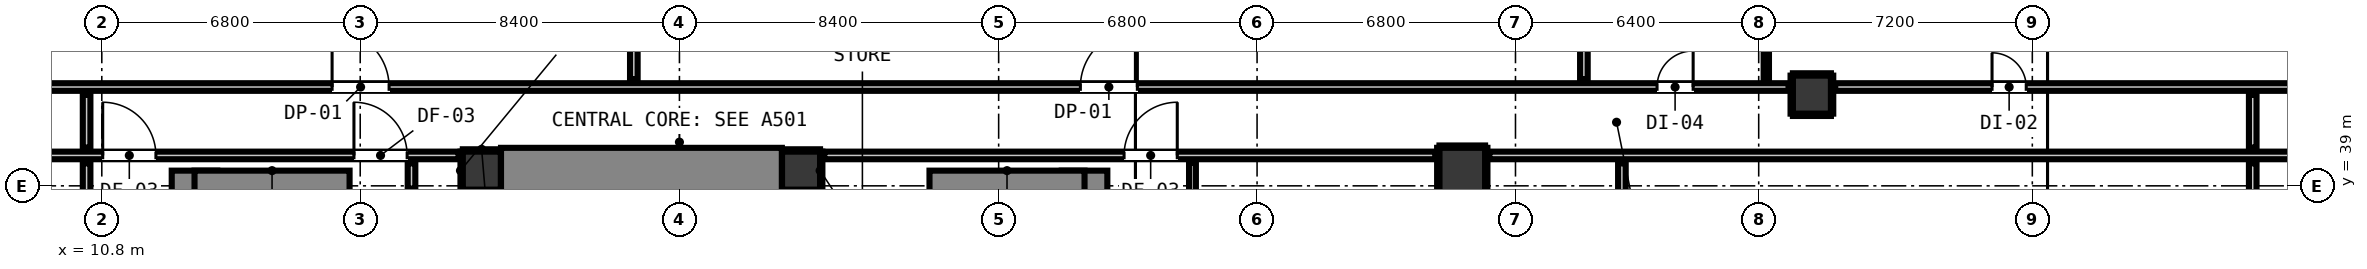
"""IFC4 building model, lengths in metres.
Left out: names, types, materials, properties, quantities, classifications, styles, units other than length and angle.
Written with IfcOpenShell. Run it as: python <this file> out.ifc"""

import sys

from ifc_helpers import new_model, si_unit, direction, frame, frame_2d, origin, origin_2d, place, context, subcontext, project, spatial, rectangle, circle, extrude, element, fill, save


model = new_model("IFC4")
c1 = context("Model", 3, precision=1e-05, world=origin(), true_north=direction((0.0, 1.0)))
c2 = subcontext(c1, "Body", "Model", "MODEL_VIEW")
j1 = project(units=[si_unit("LENGTHUNIT", "METRE"), si_unit("PLANEANGLEUNIT", "RADIAN")], contexts=[c1])
p1 = place(None, origin())
s1 = spatial("IfcSite", under=j1, at=p1, CompositionType="ELEMENT")
p2 = place(p1, origin())
s2 = spatial("IfcBuilding", under=s1, at=p2, CompositionType="ELEMENT")
p3 = place(p2, frame((0.0, 0.0, -13.2)))
s3 = spatial("IfcBuildingStorey", under=s2, at=p3, CompositionType="ELEMENT", Elevation=-13.2)
for number, where, z_axis, x_axis in (
    (1, (20.8, 39.4, -0.4), (0.0, 0.0, 1.0), (1.0, 0.0, 0.0)),
    (2, (29.2, 39.4, -0.4), (0.0, 0.0, 1.0), (1.0, 0.0, 0.0)),
):
    element("IfcColumn", number, at=place(p3, frame(where, z_axis=z_axis, x_axis=x_axis)), inside=s3, PredefinedType="COLUMN", context=c2, shape_type="SweptSolid", body=[
        extrude(rectangle(XDim=1.0, YDim=1.0, at=origin_2d()), origin(), (0.0, 0.0, 1.0), 4.8),
    ])
p4 = place(p3, frame((13.24, 31.205, 0.0), z_axis=(0.0, 0.0, 1.0), x_axis=(0.0, 1.0, 0.0)))
e3 = element("IfcWall", 3, at=p4, inside=s3, PredefinedType="SHEAR", context=c2, shape_type="SweptSolid", body=[
    extrude(rectangle(XDim=8.195, YDim=1.2, at=frame_2d((4.097, 0.0))), origin(), (0.0, 0.0, 1.0), 4.4),
])
p5 = place(p3, frame((13.24, 39.1, 0.0), z_axis=(0.0, 0.0, 1.0), x_axis=(1.0, 0.0, 0.0)))
e4 = element("IfcWall", 4, at=p5, inside=s3, PredefinedType="SHEAR", context=c2, shape_type="SweptSolid", body=[
    extrude(rectangle(XDim=4.08, YDim=0.6, at=frame_2d((2.04, 0.0))), origin(), (0.0, 0.0, 1.0), 4.4),
])
p6 = place(p3, frame((36.66, 31.205, 0.0), z_axis=(0.0, 0.0, 1.0), x_axis=(0.0, 1.0, 0.0)))
e5 = element("IfcWall", 5, at=p6, inside=s3, PredefinedType="SHEAR", context=c2, shape_type="SweptSolid", body=[
    extrude(rectangle(XDim=8.195, YDim=1.2, at=frame_2d((4.097, 0.0))), origin(), (0.0, 0.0, 1.0), 4.4),
])
p7 = place(p3, frame((32.58, 39.1, 0.0), z_axis=(0.0, 0.0, 1.0), x_axis=(1.0, 0.0, 0.0)))
e6 = element("IfcWall", 6, at=p7, inside=s3, PredefinedType="SHEAR", context=c2, shape_type="SweptSolid", body=[
    extrude(rectangle(XDim=4.08, YDim=0.6, at=frame_2d((2.04, 0.0))), origin(), (0.0, 0.0, 1.0), 4.4),
])
p8 = place(p3, frame((21.305, 39.4, 0.0), z_axis=(0.0, 0.0, 1.0), x_axis=(1.0, 0.0, 0.0)))
e7 = element("IfcWall", 7, at=p8, inside=s3, PredefinedType="SHEAR", context=c2, shape_type="SweptSolid", body=[
    extrude(rectangle(XDim=7.39, YDim=1.2, at=frame_2d((3.695, 0.0))), origin(), (0.0, 0.0, 1.0), 4.4),
])
p9 = place(p3, frame((46.6, 39.4, -0.4), z_axis=(0.0, 0.0, 1.0), x_axis=(1.0, 0.0, 0.0)))
e8 = element("IfcColumn", 8, at=p9, inside=s3, PredefinedType="COLUMN", context=c2, shape_type="SweptSolid", body=[
    extrude(circle(Radius=0.6, at=origin_2d()), origin(), (0.0, 0.0, 1.0), 4.8),
])
p10 = place(p3, frame((55.8, 41.4, -0.4), z_axis=(0.0, 0.0, 1.0), x_axis=(1.0, 0.0, 0.0)))
e9 = element("IfcColumn", 9, at=p10, inside=s3, PredefinedType="COLUMN", context=c2, shape_type="SweptSolid", body=[
    extrude(rectangle(XDim=1.0, YDim=1.0, at=origin_2d()), origin(), (0.0, 0.0, 1.0), 4.8),
])
p11 = place(p3, frame((6.312, 39.8, 0.0), z_axis=(0.0, 0.0, 1.0), x_axis=(1.0, 0.0, 0.0)))
e10 = element("IfcWall", 10, at=p11, inside=s3, PredefinedType="PARTITIONING", context=c2, shape_type="SweptSolid", body=[
    extrude(rectangle(XDim=13.876, YDim=0.2, at=frame_2d((6.938, 0.0))), origin(), (0.0, 0.0, 1.0), 3.335),
])
p12 = place(p11, frame((11.123, 0.0, 0.0)))
e11 = element("IfcOpeningElement", 11, at=p12, cuts=e10, PredefinedType="OPENING", context=c2, shape_type="SweptSolid", body=[
    extrude(rectangle(XDim=1.4, YDim=2.15, at=frame_2d((0.7, 1.075))), frame((0.0, 0.11, 0.0), z_axis=(0.0, -1.0, 0.0), x_axis=(1.0, 0.0, 0.0)), (0.0, 0.0, 1.0), 0.22),
])
p13 = place(p11, frame((4.512, 0.0, 0.0)))
e12 = element("IfcOpeningElement", 12, at=p13, cuts=e10, PredefinedType="OPENING", context=c2, shape_type="SweptSolid", body=[
    extrude(rectangle(XDim=1.4, YDim=2.15, at=frame_2d((0.7, 1.075))), frame((0.0, 0.11, 0.0), z_axis=(0.0, -1.0, 0.0), x_axis=(1.0, 0.0, 0.0)), (0.0, 0.0, 1.0), 0.22),
])
p14 = place(p3, frame((29.812, 39.8, 0.0), z_axis=(0.0, 0.0, 1.0), x_axis=(1.0, 0.0, 0.0)))
e13 = element("IfcWall", 13, at=p14, inside=s3, PredefinedType="PARTITIONING", context=c2, shape_type="SweptSolid", body=[
    extrude(rectangle(XDim=16.076, YDim=0.2, at=frame_2d((8.038, 0.0))), origin(), (0.0, 0.0, 1.0), 3.335),
])
p15 = place(p14, frame((7.888, 0.0, 0.0)))
e14 = element("IfcOpeningElement", 14, at=p15, cuts=e13, PredefinedType="OPENING", context=c2, shape_type="SweptSolid", body=[
    extrude(rectangle(XDim=1.4, YDim=2.15, at=frame_2d((0.7, 1.075))), frame((0.0, 0.11, 0.0), z_axis=(0.0, -1.0, 0.0), x_axis=(1.0, 0.0, 0.0)), (0.0, 0.0, 1.0), 0.22),
])
p16 = place(p3, frame((47.312, 39.8, 0.0), z_axis=(0.0, 0.0, 1.0), x_axis=(1.0, 0.0, 0.0)))
e15 = element("IfcWall", 15, at=p16, inside=s3, PredefinedType="PARTITIONING", context=c2, shape_type="SweptSolid", body=[
    extrude(rectangle(XDim=23.088, YDim=0.2, at=frame_2d((11.544, 0.0))), origin(), (0.0, 0.0, 1.0), 4.1),
])
p17 = place(p3, frame((2.2, 41.6, 0.0), z_axis=(0.0, 0.0, 1.0), x_axis=(1.0, 0.0, 0.0)))
e16 = element("IfcWall", 16, at=p17, inside=s3, PredefinedType="PARTITIONING", context=c2, shape_type="SweptSolid", body=[
    extrude(rectangle(XDim=52.988, YDim=0.2, at=frame_2d((26.494, 0.0))), origin(), (0.0, 0.0, 1.0), 4.1),
])
p18 = place(p17, frame((14.66, 0.0, 0.0)))
e17 = element("IfcOpeningElement", 17, at=p18, cuts=e16, PredefinedType="OPENING", context=c2, shape_type="SweptSolid", body=[
    extrude(rectangle(XDim=1.5, YDim=2.15, at=frame_2d((0.75, 1.075))), frame((0.0, 0.11, 0.0), z_axis=(0.0, -1.0, 0.0), x_axis=(1.0, 0.0, 0.0)), (0.0, 0.0, 1.0), 0.22),
])
p19 = place(p17, frame((34.35, 0.0, 0.0)))
e18 = element("IfcOpeningElement", 18, at=p19, cuts=e16, PredefinedType="OPENING", context=c2, shape_type="SweptSolid", body=[
    extrude(rectangle(XDim=1.5, YDim=2.15, at=frame_2d((0.75, 1.075))), frame((0.0, 0.11, 0.0), z_axis=(0.0, -1.0, 0.0), x_axis=(1.0, 0.0, 0.0)), (0.0, 0.0, 1.0), 0.22),
])
p20 = place(p17, frame((49.525, 0.0, 0.0)))
e19 = element("IfcOpeningElement", 19, at=p20, cuts=e16, PredefinedType="OPENING", context=c2, shape_type="SweptSolid", body=[
    extrude(rectangle(XDim=0.95, YDim=2.1, at=frame_2d((0.475, 1.05))), frame((0.0, 0.11, 0.0), z_axis=(0.0, -1.0, 0.0), x_axis=(1.0, 0.0, 0.0)), (0.0, 0.0, 1.0), 0.22),
])
p21 = place(p3, frame((56.412, 41.6, 0.0), z_axis=(0.0, 0.0, 1.0), x_axis=(1.0, 0.0, 0.0)))
e20 = element("IfcWall", 20, at=p21, inside=s3, PredefinedType="PARTITIONING", context=c2, shape_type="SweptSolid", body=[
    extrude(rectangle(XDim=24.776, YDim=0.2, at=frame_2d((12.388, 0.0))), origin(), (0.0, 0.0, 1.0), 4.1),
])
p22 = place(p21, frame((4.128, 0.0, 0.0)))
e21 = element("IfcOpeningElement", 21, at=p22, cuts=e20, PredefinedType="OPENING", context=c2, shape_type="SweptSolid", body=[
    extrude(rectangle(XDim=0.9, YDim=2.1, at=frame_2d((0.45, 1.05))), frame((0.0, 0.11, 0.0), z_axis=(0.0, -1.0, 0.0), x_axis=(1.0, 0.0, 0.0)), (0.0, 0.0, 1.0), 0.22),
])
p23 = place(p3, frame((10.4, 21.828, 0.0), z_axis=(0.0, 0.0, 1.0), x_axis=(0.0, 1.0, 0.0)))
e22 = element("IfcWall", 22, at=p23, inside=s3, PredefinedType="PARTITIONING", context=c2, shape_type="SweptSolid", body=[
    extrude(rectangle(XDim=17.764, YDim=0.2, at=frame_2d((8.882, 0.0))), origin(), (0.0, 0.0, 1.0), 4.1),
])
p24 = place(p3, frame((10.4, 40.008, 0.0), z_axis=(0.0, 0.0, 1.0), x_axis=(0.0, 1.0, 0.0)))
e23 = element("IfcWall", 23, at=p24, inside=s3, PredefinedType="PARTITIONING", context=c2, shape_type="SweptSolid", body=[
    extrude(rectangle(XDim=1.384, YDim=0.2, at=frame_2d((0.692, 0.0))), origin(), (0.0, 0.0, 1.0), 4.1),
])
p25 = place(p3, frame((18.95, 38.928, 0.0), z_axis=(0.0, 0.0, 1.0), x_axis=(0.0, 1.0, 0.0)))
e24 = element("IfcWall", 24, at=p25, inside=s3, PredefinedType="PARTITIONING", context=c2, shape_type="SweptSolid", body=[
    extrude(rectangle(XDim=0.664, YDim=0.2, at=frame_2d((0.332, 0.0))), origin(), (0.0, 0.0, 1.0), 4.1),
])
p26 = place(p3, frame((24.8, 41.808, 0.0), z_axis=(0.0, 0.0, 1.0), x_axis=(0.0, 1.0, 0.0)))
e25 = element("IfcWall", 25, at=p26, inside=s3, PredefinedType="PARTITIONING", context=c2, shape_type="SweptSolid", body=[
    extrude(rectangle(XDim=15.784, YDim=0.2, at=frame_2d((7.892, 0.0))), origin(), (0.0, 0.0, 1.0), 4.1),
])
p27 = place(p3, frame((49.8, 41.808, 0.0), z_axis=(0.0, 0.0, 1.0), x_axis=(0.0, 1.0, 0.0)))
e26 = element("IfcWall", 26, at=p27, inside=s3, PredefinedType="PARTITIONING", context=c2, shape_type="SweptSolid", body=[
    extrude(rectangle(XDim=4.214, YDim=0.2, at=frame_2d((2.107, 0.0))), origin(), (0.0, 0.0, 1.0), 4.1),
])
p28 = place(p3, frame((50.8, 36.808, 0.0), z_axis=(0.0, 0.0, 1.0), x_axis=(0.0, 1.0, 0.0)))
e27 = element("IfcWall", 27, at=p28, inside=s3, PredefinedType="PARTITIONING", context=c2, shape_type="SweptSolid", body=[
    extrude(rectangle(XDim=2.784, YDim=0.2, at=frame_2d((1.392, 0.0))), origin(), (0.0, 0.0, 1.0), 4.1),
])
p29 = place(p3, frame((67.4, 21.828, 0.0), z_axis=(0.0, 0.0, 1.0), x_axis=(0.0, 1.0, 0.0)))
e28 = element("IfcWall", 28, at=p29, inside=s3, PredefinedType="PARTITIONING", context=c2, shape_type="SweptSolid", body=[
    extrude(rectangle(XDim=17.764, YDim=0.2, at=frame_2d((8.882, 0.0))), origin(), (0.0, 0.0, 1.0), 4.1),
])
p30 = place(p3, frame((67.4, 40.008, 0.0), z_axis=(0.0, 0.0, 1.0), x_axis=(0.0, 1.0, 0.0)))
e29 = element("IfcWall", 29, at=p30, inside=s3, PredefinedType="PARTITIONING", context=c2, shape_type="SweptSolid", body=[
    extrude(rectangle(XDim=1.384, YDim=0.2, at=frame_2d((0.692, 0.0))), origin(), (0.0, 0.0, 1.0), 4.1),
])
p31 = place(p3, frame((39.5, 21.818, 0.0), z_axis=(0.0, 0.0, 1.0), x_axis=(0.0, 1.0, 0.0)))
e30 = element("IfcWall", 30, at=p31, inside=s3, PredefinedType="PARTITIONING", context=c2, shape_type="SweptSolid", body=[
    extrude(rectangle(XDim=17.784, YDim=0.18, at=frame_2d((8.892, 0.0))), origin(), (0.0, 0.0, 1.0), 4.1),
])
p32 = place(p3, frame((54.6, 41.778, 0.0), z_axis=(0.0, 0.0, 1.0), x_axis=(0.0, 1.0, 0.0)))
e31 = element("IfcWall", 31, at=p32, inside=s3, PredefinedType="PARTITIONING", context=c2, shape_type="SweptSolid", body=[
    extrude(rectangle(XDim=4.274, YDim=0.14, at=frame_2d((2.137, 0.0))), origin(), (0.0, 0.0, 1.0), 4.1),
])
for number, where, z_axis, x_axis in (
    (32, (20.3, 38.868, 0.0), (0.0, 0.0, 1.0), (1.0, 0.0, 0.0)),
    (33, (20.3, 39.932, 0.0), (0.0, 0.0, 1.0), (1.0, 0.0, 0.0)),
):
    element("IfcWall", number, at=place(p3, frame(where, z_axis=z_axis, x_axis=x_axis)), inside=s3, PredefinedType="PARTITIONING", context=c2, shape_type="SweptSolid", body=[
        extrude(rectangle(XDim=0.99, YDim=0.06, at=frame_2d((0.495, 0.0))), origin(), (0.0, 0.0, 1.0), 1.45),
    ])
p33 = place(p3, frame((20.268, 38.9, 0.0), z_axis=(0.0, 0.0, 1.0), x_axis=(0.0, 1.0, 0.0)))
e34 = element("IfcWall", 34, at=p33, inside=s3, PredefinedType="PARTITIONING", context=c2, shape_type="SweptSolid", body=[
    extrude(rectangle(XDim=1.0, YDim=0.06, at=frame_2d((0.5, 0.0))), origin(), (0.0, 0.0, 1.0), 1.45),
])
for number, where, z_axis, x_axis in (
    (35, (28.71, 38.868, 0.0), (0.0, 0.0, 1.0), (1.0, 0.0, 0.0)),
    (36, (28.71, 39.932, 0.0), (0.0, 0.0, 1.0), (1.0, 0.0, 0.0)),
):
    element("IfcWall", number, at=place(p3, frame(where, z_axis=z_axis, x_axis=x_axis)), inside=s3, PredefinedType="PARTITIONING", context=c2, shape_type="SweptSolid", body=[
        extrude(rectangle(XDim=0.99, YDim=0.06, at=frame_2d((0.495, 0.0))), origin(), (0.0, 0.0, 1.0), 1.45),
    ])
p34 = place(p3, frame((29.732, 38.9, 0.0), z_axis=(0.0, 0.0, 1.0), x_axis=(0.0, 1.0, 0.0)))
e37 = element("IfcWall", 37, at=p34, inside=s3, PredefinedType="PARTITIONING", context=c2, shape_type="SweptSolid", body=[
    extrude(rectangle(XDim=1.0, YDim=0.06, at=frame_2d((0.5, 0.0))), origin(), (0.0, 0.0, 1.0), 1.45),
])
for number, where, z_axis, x_axis in (
    (38, (46.0, 40.032, 0.0), (0.0, 0.0, 1.0), (1.0, 0.0, 0.0)),
    (39, (45.968, 38.8, 0.0), (0.0, 0.0, 1.0), (0.0, 1.0, 0.0)),
    (40, (47.232, 38.8, 0.0), (0.0, 0.0, 1.0), (0.0, 1.0, 0.0)),
):
    element("IfcWall", number, at=place(p3, frame(where, z_axis=z_axis, x_axis=x_axis)), inside=s3, PredefinedType="PARTITIONING", context=c2, shape_type="SweptSolid", body=[
        extrude(rectangle(XDim=1.2, YDim=0.06, at=frame_2d((0.6, 0.0))), origin(), (0.0, 0.0, 1.0), 1.45),
    ])
for number, where, z_axis, x_axis in (
    (41, (55.3, 40.868, 0.0), (0.0, 0.0, 1.0), (1.0, 0.0, 0.0)),
    (42, (55.3, 41.932, 0.0), (0.0, 0.0, 1.0), (1.0, 0.0, 0.0)),
    (43, (55.268, 40.9, 0.0), (0.0, 0.0, 1.0), (0.0, 1.0, 0.0)),
    (44, (56.332, 40.9, 0.0), (0.0, 0.0, 1.0), (0.0, 1.0, 0.0)),
):
    element("IfcWall", number, at=place(p3, frame(where, z_axis=z_axis, x_axis=x_axis)), inside=s3, PredefinedType="PARTITIONING", context=c2, shape_type="SweptSolid", body=[
        extrude(rectangle(XDim=1.0, YDim=0.06, at=frame_2d((0.5, 0.0))), origin(), (0.0, 0.0, 1.0), 1.45),
    ])
p35 = place(p12, origin())
e45 = element("IfcDoor", 45, at=p35, inside=s3, OperationType="SINGLE_SWING_LEFT", PredefinedType="DOOR", context=c2, shape_type="SweptSolid", body=[
    extrude(rectangle(XDim=1.4, YDim=2.15, at=frame_2d((0.7, 1.075))), frame((0.0, 0.025, 0.0), z_axis=(0.0, -1.0, 0.0), x_axis=(1.0, 0.0, 0.0)), (0.0, 0.0, 1.0), 0.05),
])
fill(e11, e45)
p36 = place(p13, origin())
e46 = element("IfcDoor", 46, at=p36, inside=s3, OperationType="SINGLE_SWING_LEFT", PredefinedType="DOOR", context=c2, shape_type="SweptSolid", body=[
    extrude(rectangle(XDim=1.4, YDim=2.15, at=frame_2d((0.7, 1.075))), frame((0.0, 0.025, 0.0), z_axis=(0.0, -1.0, 0.0), x_axis=(1.0, 0.0, 0.0)), (0.0, 0.0, 1.0), 0.05),
])
fill(e12, e46)
p37 = place(p15, origin())
e47 = element("IfcDoor", 47, at=p37, inside=s3, OperationType="SINGLE_SWING_RIGHT", PredefinedType="DOOR", context=c2, shape_type="SweptSolid", body=[
    extrude(rectangle(XDim=1.4, YDim=2.15, at=frame_2d((0.7, 1.075))), frame((0.0, 0.025, 0.0), z_axis=(0.0, -1.0, 0.0), x_axis=(1.0, 0.0, 0.0)), (0.0, 0.0, 1.0), 0.05),
])
fill(e14, e47)
p38 = place(p18, origin())
e48 = element("IfcDoor", 48, at=p38, inside=s3, OperationType="SINGLE_SWING_LEFT", PredefinedType="DOOR", context=c2, shape_type="SweptSolid", body=[
    extrude(rectangle(XDim=1.5, YDim=2.15, at=frame_2d((0.75, 1.075))), frame((0.0, 0.025, 0.0), z_axis=(0.0, -1.0, 0.0), x_axis=(1.0, 0.0, 0.0)), (0.0, 0.0, 1.0), 0.05),
])
fill(e17, e48)
p39 = place(p19, origin())
e49 = element("IfcDoor", 49, at=p39, inside=s3, OperationType="SINGLE_SWING_RIGHT", PredefinedType="DOOR", context=c2, shape_type="SweptSolid", body=[
    extrude(rectangle(XDim=1.5, YDim=2.15, at=frame_2d((0.75, 1.075))), frame((0.0, 0.025, 0.0), z_axis=(0.0, -1.0, 0.0), x_axis=(1.0, 0.0, 0.0)), (0.0, 0.0, 1.0), 0.05),
])
fill(e18, e49)
p40 = place(p20, origin())
e50 = element("IfcDoor", 50, at=p40, inside=s3, OperationType="SINGLE_SWING_RIGHT", PredefinedType="DOOR", context=c2, shape_type="SweptSolid", body=[
    extrude(rectangle(XDim=0.95, YDim=2.1, at=frame_2d((0.475, 1.05))), frame((0.0, 0.025, 0.0), z_axis=(0.0, -1.0, 0.0), x_axis=(1.0, 0.0, 0.0)), (0.0, 0.0, 1.0), 0.05),
])
fill(e19, e50)
p41 = place(p22, origin())
e51 = element("IfcDoor", 51, at=p41, inside=s3, OperationType="SINGLE_SWING_LEFT", PredefinedType="DOOR", context=c2, shape_type="SweptSolid", body=[
    extrude(rectangle(XDim=0.9, YDim=2.1, at=frame_2d((0.45, 1.05))), frame((0.0, 0.025, 0.0), z_axis=(0.0, -1.0, 0.0), x_axis=(1.0, 0.0, 0.0)), (0.0, 0.0, 1.0), 0.05),
])
fill(e21, e51)
save(model, sys.argv[1])
